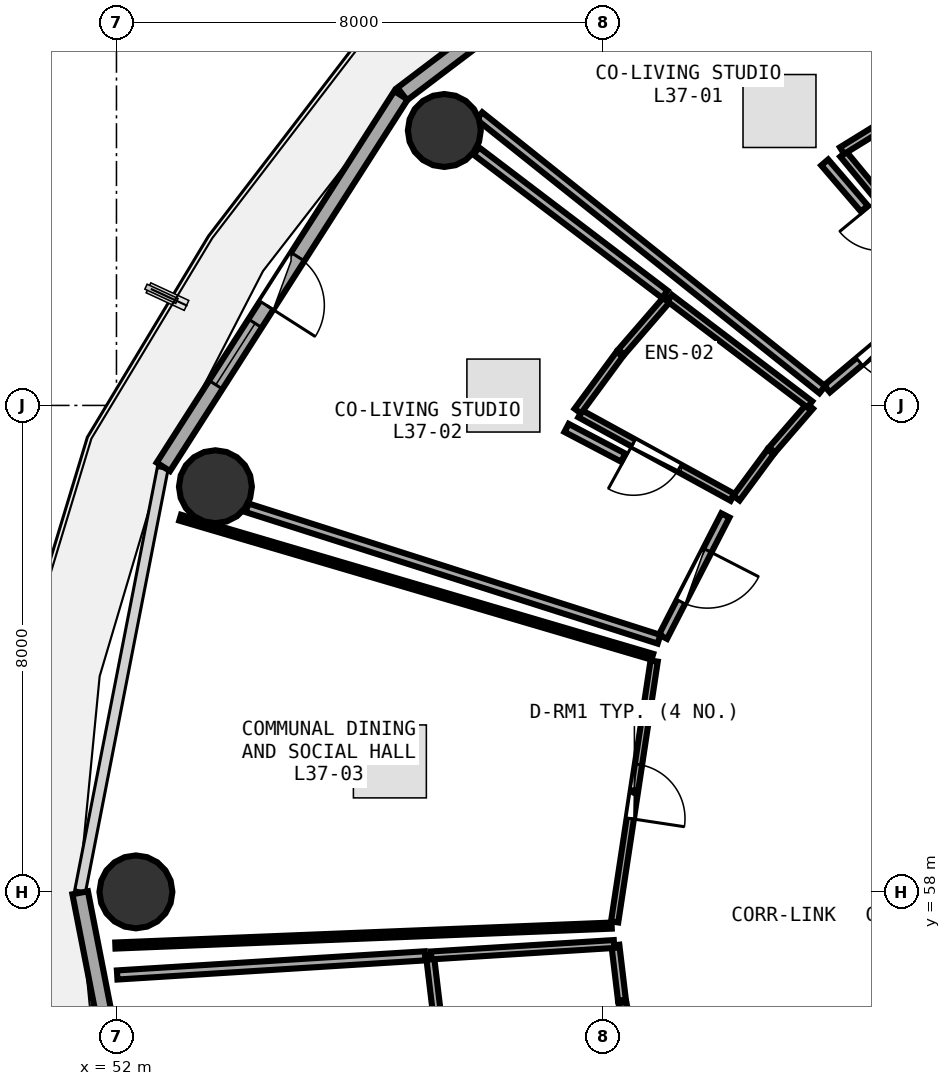
"""IFC4 building model, lengths in metres.
Left out: names, types, materials, properties, quantities, classifications, styles, units other than length and angle.
Written with IfcOpenShell. Run it as: python <this file> out.ifc"""

import sys

from ifc_helpers import new_model, si_unit, direction, frame, frame_2d, origin, origin_2d, place, context, subcontext, project, spatial, rectangle, circle, extrude, element, fill, save


model = new_model("IFC4")
c1 = context("Model", 3, precision=1e-05, world=origin(), true_north=direction((0.0, 1.0)))
c2 = subcontext(c1, "Body", "Model", "MODEL_VIEW")
j1 = project(units=[si_unit("LENGTHUNIT", "METRE"), si_unit("PLANEANGLEUNIT", "RADIAN")], contexts=[c1])
p1 = place(None, origin())
s1 = spatial("IfcSite", under=j1, at=p1, CompositionType="ELEMENT")
p2 = place(p1, origin())
s2 = spatial("IfcBuilding", under=s1, at=p2, CompositionType="ELEMENT")
p3 = place(p2, frame((0.0, 0.0, 146.85)))
s3 = spatial("IfcBuildingStorey", under=s2, at=p3, CompositionType="ELEMENT", Elevation=146.85)
for number, where, z_axis, x_axis in (
    (1, (57.392, 70.521, 0.0), (0.0, 0.0, 1.0), (1.0, 0.0, 0.0)),
    (2, (53.627, 64.663, 0.0), (0.0, 0.0, 1.0), (1.0, 0.0, 0.0)),
    (3, (52.32, 58.0, 0.0), (0.0, 0.0, 1.0), (1.0, 0.0, 0.0)),
):
    element("IfcColumn", number, at=place(p3, frame(where, z_axis=z_axis, x_axis=x_axis)), inside=s3, PredefinedType="COLUMN", context=c2, shape_type="SweptSolid", body=[
        extrude(circle(Radius=0.6, at=origin_2d()), origin(), (0.0, 0.0, 1.0), 3.75),
    ])
p4 = place(p3, frame((62.688, 75.658, 0.0), z_axis=(0.0, 0.0, 1.0), x_axis=(-0.797163719609, -0.603763202042, 0.0)))
e4 = element("IfcWall", 4, at=p4, inside=s3, PredefinedType="SOLIDWALL", context=c2, shape_type="SweptSolid", body=[
    extrude(rectangle(XDim=7.512, YDim=0.26, at=frame_2d((3.756, 0.0))), origin(), (0.0, 0.0, 1.0), 3.475),
])
p5 = place(p4, frame((2.956, 0.0, 0.85)))
e5 = element("IfcOpeningElement", 5, at=p5, cuts=e4, PredefinedType="OPENING", context=c2, shape_type="SweptSolid", body=[
    extrude(rectangle(XDim=1.6, YDim=1.45, at=frame_2d((0.8, 0.725))), frame((0.0, 0.14, 0.0), z_axis=(0.0, -1.0, 0.0), x_axis=(1.0, 0.0, 0.0)), (0.0, 0.0, 1.0), 0.28),
])
p6 = place(p3, frame((56.679, 71.1, 0.0), z_axis=(0.0, 0.0, 1.0), x_axis=(-0.538801521808, -0.842432739213, 0.0)))
e6 = element("IfcWall", 6, at=p6, inside=s3, PredefinedType="SOLIDWALL", context=c2, shape_type="SweptSolid", body=[
    extrude(rectangle(XDim=7.253, YDim=0.26, at=frame_2d((3.627, 0.0))), origin(), (0.0, 0.0, 1.0), 3.475),
])
p7 = place(p6, frame((3.152, 0.0, 0.0)))
e7 = element("IfcOpeningElement", 7, at=p7, cuts=e6, PredefinedType="OPENING", context=c2, shape_type="SweptSolid", body=[
    extrude(rectangle(XDim=0.95, YDim=2.1, at=frame_2d((0.475, 1.05))), frame((0.0, 0.14, 0.0), z_axis=(0.0, -1.0, 0.0), x_axis=(1.0, 0.0, 0.0)), (0.0, 0.0, 1.0), 0.28),
])
p8 = place(p6, frame((4.452, 0.0, 0.85)))
e8 = element("IfcOpeningElement", 8, at=p8, cuts=e6, PredefinedType="OPENING", context=c2, shape_type="SweptSolid", body=[
    extrude(rectangle(XDim=1.2, YDim=1.45, at=frame_2d((0.6, 0.725))), frame((0.0, 0.14, 0.0), z_axis=(0.0, -1.0, 0.0), x_axis=(1.0, 0.0, 0.0)), (0.0, 0.0, 1.0), 0.28),
])
p9 = place(p3, frame((51.403, 57.985, 0.0), z_axis=(0.0, 0.0, 1.0), x_axis=(0.191716984769, -0.981450252306, 0.0)))
e9 = element("IfcWall", 9, at=p9, inside=s3, PredefinedType="SOLIDWALL", context=c2, shape_type="SweptSolid", body=[
    extrude(rectangle(XDim=7.079, YDim=0.26, at=frame_2d((3.54, 0.0))), origin(), (0.0, 0.0, 1.0), 3.475),
])
p10 = place(p9, frame((2.74, 0.0, 0.85)))
e10 = element("IfcOpeningElement", 10, at=p10, cuts=e9, PredefinedType="OPENING", context=c2, shape_type="SweptSolid", body=[
    extrude(rectangle(XDim=1.6, YDim=1.45, at=frame_2d((0.8, 0.725))), frame((0.0, 0.14, 0.0), z_axis=(0.0, -1.0, 0.0), x_axis=(1.0, 0.0, 0.0)), (0.0, 0.0, 1.0), 0.28),
])
p11 = place(p3, frame((65.702, 68.016, 0.0), z_axis=(0.0, 0.0, 1.0), x_axis=(-0.636757315483, 0.771064278241, 0.0)))
e11 = element("IfcWall", 11, at=p11, inside=s3, PredefinedType="PLUMBINGWALL", context=c2, shape_type="SweptSolid", body=[
    extrude(rectangle(XDim=2.745, YDim=0.13, at=frame_2d((1.373, 0.0))), origin(), (0.0, 0.0, 1.0), 2.975),
])
p12 = place(p11, frame((0.942, 0.0, 0.0)))
e12 = element("IfcOpeningElement", 12, at=p12, cuts=e11, PredefinedType="OPENING", context=c2, shape_type="SweptSolid", body=[
    extrude(rectangle(XDim=0.86, YDim=2.05, at=frame_2d((0.43, 1.025))), frame((0.0, 0.075, 0.0), z_axis=(0.0, -1.0, 0.0), x_axis=(1.0, 0.0, 0.0)), (0.0, 0.0, 1.0), 0.15),
])
p13 = place(p3, frame((65.473, 67.78, 0.0), z_axis=(0.0, 0.0, 1.0), x_axis=(-0.764572750514, -0.644537438146, 0.0)))
e13 = element("IfcWall", 13, at=p13, inside=s3, PredefinedType="PARTITIONING", context=c2, shape_type="SweptSolid", body=[
    extrude(rectangle(XDim=2.339, YDim=0.15, at=frame_2d((1.169, 0.0))), origin(), (0.0, 0.0, 1.0), 2.975),
])
p14 = place(p13, frame((0.694, 0.0, 0.0)))
e14 = element("IfcOpeningElement", 14, at=p14, cuts=e13, PredefinedType="OPENING", context=c2, shape_type="SweptSolid", body=[
    extrude(rectangle(XDim=0.95, YDim=2.08, at=frame_2d((0.475, 1.04))), frame((0.0, 0.085, 0.0), z_axis=(0.0, -1.0, 0.0), x_axis=(1.0, 0.0, 0.0)), (0.0, 0.0, 1.0), 0.17),
])
p15 = place(p3, frame((62.131, 64.489, 0.0), z_axis=(0.0, 0.0, 1.0), x_axis=(-0.87680194327, 0.480851694681, 0.0)))
e15 = element("IfcWall", 15, at=p15, inside=s3, PredefinedType="PLUMBINGWALL", context=c2, shape_type="SweptSolid", body=[
    extrude(rectangle(XDim=2.855, YDim=0.13, at=frame_2d((1.428, 0.0))), origin(), (0.0, 0.0, 1.0), 2.975),
])
p16 = place(p15, frame((0.998, 0.0, 0.0)))
e16 = element("IfcOpeningElement", 16, at=p16, cuts=e15, PredefinedType="OPENING", context=c2, shape_type="SweptSolid", body=[
    extrude(rectangle(XDim=0.86, YDim=2.05, at=frame_2d((0.43, 1.025))), frame((0.0, 0.075, 0.0), z_axis=(0.0, -1.0, 0.0), x_axis=(1.0, 0.0, 0.0)), (0.0, 0.0, 1.0), 0.15),
])
p17 = place(p3, frame((62.015, 64.192, 0.0), z_axis=(0.0, 0.0, 1.0), x_axis=(-0.457234963971, -0.889345932538, 0.0)))
e17 = element("IfcWall", 17, at=p17, inside=s3, PredefinedType="PARTITIONING", context=c2, shape_type="SweptSolid", body=[
    extrude(rectangle(XDim=2.245, YDim=0.15, at=frame_2d((1.122, 0.0))), origin(), (0.0, 0.0, 1.0), 3.235),
])
p18 = place(p17, frame((0.647, 0.0, 0.0)))
e18 = element("IfcOpeningElement", 18, at=p18, cuts=e17, PredefinedType="OPENING", context=c2, shape_type="SweptSolid", body=[
    extrude(rectangle(XDim=0.95, YDim=2.08, at=frame_2d((0.475, 1.04))), frame((0.0, 0.085, 0.0), z_axis=(0.0, -1.0, 0.0), x_axis=(1.0, 0.0, 0.0)), (0.0, 0.0, 1.0), 0.17),
])
p19 = place(p3, frame((60.843, 61.796, 0.0), z_axis=(0.0, 0.0, 1.0), x_axis=(-0.149807046494, -0.988715251638, 0.0)))
e19 = element("IfcWall", 19, at=p19, inside=s3, PredefinedType="PARTITIONING", context=c2, shape_type="SweptSolid", body=[
    extrude(rectangle(XDim=4.338, YDim=0.12, at=frame_2d((2.169, 0.0))), origin(), (0.0, 0.0, 1.0), 2.975),
])
p20 = place(p19, frame((1.719, 0.0, 0.0)))
e20 = element("IfcOpeningElement", 20, at=p20, cuts=e19, PredefinedType="OPENING", context=c2, shape_type="SweptSolid", body=[
    extrude(rectangle(XDim=0.9, YDim=2.08, at=frame_2d((0.45, 1.04))), frame((0.0, 0.07, 0.0), z_axis=(0.0, -1.0, 0.0), x_axis=(1.0, 0.0, 0.0)), (0.0, 0.0, 1.0), 0.14),
])
p21 = place(p3, frame((67.918, 69.207, 0.0), z_axis=(0.0, 0.0, 1.0), x_axis=(-0.475160964166, 0.879898890858, 0.0)))
e21 = element("IfcWall", 21, at=p21, inside=s3, PredefinedType="PARTITIONING", context=c2, shape_type="SweptSolid", body=[
    extrude(rectangle(XDim=7.53, YDim=0.1, at=frame_2d((3.765, 0.0))), origin(), (0.0, 0.0, 1.0), 3.025),
])
p22 = place(p3, frame((63.933, 70.189, 0.0), z_axis=(0.0, 0.0, 1.0), x_axis=(0.851319302067, 0.524647925688, 0.0)))
e22 = element("IfcWall", 22, at=p22, inside=s3, PredefinedType="PLUMBINGWALL", context=c2, shape_type="SweptSolid", body=[
    extrude(rectangle(XDim=1.212, YDim=0.13, at=frame_2d((0.606, 0.0))), origin(), (0.0, 0.0, 1.0), 2.975),
])
p23 = place(p3, frame((63.608, 66.259, 0.0), z_axis=(0.0, 0.0, 1.0), x_axis=(-0.781429667655, 0.623993328898, 0.0)))
e23 = element("IfcWall", 23, at=p23, inside=s3, PredefinedType="PARTITIONING", context=c2, shape_type="SweptSolid", body=[
    extrude(rectangle(XDim=7.216, YDim=0.15, at=frame_2d((3.608, 0.0))), origin(), (0.0, 0.0, 1.0), 2.975),
])
p24 = place(p3, frame((63.688, 75.534, 0.0), z_axis=(0.0, 0.0, 1.0), x_axis=(0.505850409321, -0.862621216636, 0.0)))
e24 = element("IfcWall", 24, at=p24, inside=s3, PredefinedType="PARTITIONING", context=c2, shape_type="SweptSolid", body=[
    extrude(rectangle(XDim=4.69, YDim=0.15, at=frame_2d((2.345, 0.0))), origin(), (0.0, 0.0, 1.0), 3.025),
])
p25 = place(p3, frame((63.648, 69.996, 0.0), z_axis=(0.0, 0.0, 1.0), x_axis=(0.651733897109, -0.758447709047, 0.0)))
e25 = element("IfcWall", 25, at=p25, inside=s3, PredefinedType="PARTITIONING", context=c2, shape_type="SweptSolid", body=[
    extrude(rectangle(XDim=1.002, YDim=0.15, at=frame_2d((0.501, 0.0))), origin(), (0.0, 0.0, 1.0), 3.48),
])
p26 = place(p3, frame((63.406, 65.989, 0.0), z_axis=(0.0, 0.0, 1.0), x_axis=(-0.654452758924, -0.756102894015, 0.0)))
e26 = element("IfcWall", 26, at=p26, inside=s3, PredefinedType="PLUMBINGWALL", context=c2, shape_type="SweptSolid", body=[
    extrude(rectangle(XDim=0.954, YDim=0.13, at=frame_2d((0.477, 0.0))), origin(), (0.0, 0.0, 1.0), 3.48),
])
p27 = place(p3, frame((62.757, 65.237, 0.0), z_axis=(0.0, 0.0, 1.0), x_axis=(-0.593701036402, -0.804685702231, 0.0)))
e27 = element("IfcWall", 27, at=p27, inside=s3, PredefinedType="PLUMBINGWALL", context=c2, shape_type="SweptSolid", body=[
    extrude(rectangle(XDim=0.945, YDim=0.13, at=frame_2d((0.473, 0.0))), origin(), (0.0, 0.0, 1.0), 2.975),
])
p28 = place(p3, frame((59.587, 65.907, 0.0), z_axis=(0.0, 0.0, 1.0), x_axis=(0.592518663081, 0.805556722956, 0.0)))
e28 = element("IfcWall", 28, at=p28, inside=s3, PredefinedType="PLUMBINGWALL", context=c2, shape_type="SweptSolid", body=[
    extrude(rectangle(XDim=1.163, YDim=0.13, at=frame_2d((0.582, 0.0))), origin(), (0.0, 0.0, 1.0), 3.48),
])
p29 = place(p3, frame((60.301, 66.875, 0.0), z_axis=(0.0, 0.0, 1.0), x_axis=(0.654502595292, 0.756059754752, 0.0)))
e29 = element("IfcWall", 29, at=p29, inside=s3, PredefinedType="PLUMBINGWALL", context=c2, shape_type="SweptSolid", body=[
    extrude(rectangle(XDim=1.173, YDim=0.13, at=frame_2d((0.586, 0.0))), origin(), (0.0, 0.0, 1.0), 3.48),
])
p30 = place(p3, frame((61.098, 67.765, 0.0), z_axis=(0.0, 0.0, 1.0), x_axis=(0.796687067956, -0.604392021581, 0.0)))
e30 = element("IfcWall", 30, at=p30, inside=s3, PredefinedType="PLUMBINGWALL", context=c2, shape_type="SweptSolid", body=[
    extrude(rectangle(XDim=2.894, YDim=0.13, at=frame_2d((1.447, 0.0))), origin(), (0.0, 0.0, 1.0), 3.235),
])
p31 = place(p3, frame((60.923, 62.154, 0.0), z_axis=(0.0, 0.0, 1.0), x_axis=(-0.952653075659, 0.304059397878, 0.0)))
e31 = element("IfcWall", 31, at=p31, inside=s3, PredefinedType="PARTITIONING", context=c2, shape_type="SweptSolid", body=[
    extrude(rectangle(XDim=7.112, YDim=0.15, at=frame_2d((3.556, 0.0))), origin(), (0.0, 0.0, 1.0), 3.175),
])
p32 = place(p3, frame((57.918, 70.184, 0.0), z_axis=(0.0, 0.0, 1.0), x_axis=(0.796177895966, -0.605062606657, 0.0)))
e32 = element("IfcWall", 32, at=p32, inside=s3, PredefinedType="PARTITIONING", context=c2, shape_type="SweptSolid", body=[
    extrude(rectangle(XDim=3.895, YDim=0.15, at=frame_2d((1.948, 0.0))), origin(), (0.0, 0.0, 1.0), 2.975),
])
p33 = place(p3, frame((59.402, 65.63, 0.0), z_axis=(0.0, 0.0, 1.0), x_axis=(0.885450338388, -0.46473400806, 0.0)))
e33 = element("IfcWall", 33, at=p33, inside=s3, PredefinedType="PARTITIONING", context=c2, shape_type="SweptSolid", body=[
    extrude(rectangle(XDim=1.054, YDim=0.15, at=frame_2d((0.527, 0.0))), origin(), (0.0, 0.0, 1.0), 3.48),
])
p34 = place(p3, frame((60.144, 57.445, 0.0), z_axis=(0.0, 0.0, 1.0), x_axis=(-0.99919531507, -0.040108881097, 0.0)))
e34 = element("IfcWall", 34, at=p34, inside=s3, PredefinedType="PARTITIONING", context=c2, shape_type="SweptSolid", body=[
    extrude(rectangle(XDim=8.169, YDim=0.1, at=frame_2d((4.084, 0.0))), origin(), (0.0, 0.0, 1.0), 3.025),
])
p35 = place(p3, frame((53.047, 64.154, 0.0), z_axis=(0.0, 0.0, 1.0), x_axis=(0.959252584651, -0.282549958133, 0.0)))
e35 = element("IfcWall", 35, at=p35, inside=s3, PredefinedType="PARTITIONING", context=c2, shape_type="SweptSolid", body=[
    extrude(rectangle(XDim=8.096, YDim=0.1, at=frame_2d((4.048, 0.0))), origin(), (0.0, 0.0, 1.0), 3.025),
])
p36 = place(p3, frame((60.205, 57.124, 0.0), z_axis=(0.0, 0.0, 1.0), x_axis=(0.118797046487, -0.992918557459, 0.0)))
e36 = element("IfcWall", 36, at=p36, inside=s3, PredefinedType="PLUMBINGWALL", context=c2, shape_type="SweptSolid", body=[
    extrude(rectangle(XDim=0.912, YDim=0.13, at=frame_2d((0.456, 0.0))), origin(), (0.0, 0.0, 1.0), 3.48),
])
p37 = place(p3, frame((60.32, 56.178, 0.0), z_axis=(0.0, 0.0, 1.0), x_axis=(0.202067144879, -0.979371670491, 0.0)))
e37 = element("IfcWall", 37, at=p37, inside=s3, PredefinedType="PLUMBINGWALL", context=c2, shape_type="SweptSolid", body=[
    extrude(rectangle(XDim=0.915, YDim=0.13, at=frame_2d((0.457, 0.0))), origin(), (0.0, 0.0, 1.0), 3.48),
])
p38 = place(p3, frame((57.292, 55.819, 0.0), z_axis=(0.0, 0.0, 1.0), x_axis=(-0.11846804652, 0.992957865145, 0.0)))
e38 = element("IfcWall", 38, at=p38, inside=s3, PredefinedType="PLUMBINGWALL", context=c2, shape_type="SweptSolid", body=[
    extrude(rectangle(XDim=1.123, YDim=0.13, at=frame_2d((0.562, 0.0))), origin(), (0.0, 0.0, 1.0), 3.48),
])
p39 = place(p3, frame((57.176, 56.955, 0.0), z_axis=(0.0, 0.0, 1.0), x_axis=(0.998056675164, 0.062312704652, 0.0)))
e39 = element("IfcWall", 39, at=p39, inside=s3, PredefinedType="PLUMBINGWALL", context=c2, shape_type="SweptSolid", body=[
    extrude(rectangle(XDim=3.013, YDim=0.13, at=frame_2d((1.506, 0.0))), origin(), (0.0, 0.0, 1.0), 3.175),
])
p40 = place(p3, frame((52.012, 56.634, 0.0), z_axis=(0.0, 0.0, 1.0), x_axis=(0.998071814667, 0.062069741162, 0.0)))
e40 = element("IfcWall", 40, at=p40, inside=s3, PredefinedType="PARTITIONING", context=c2, shape_type="SweptSolid", body=[
    extrude(rectangle(XDim=5.074, YDim=0.15, at=frame_2d((2.537, 0.0))), origin(), (0.0, 0.0, 1.0), 3.025),
])
p41 = place(p7, frame((0.95, 0.0, 0.0), z_axis=(0.0, 0.0, 1.0), x_axis=(-1.0, 0.0, 0.0)))
e41 = element("IfcDoor", 41, at=p41, inside=s3, OperationType="SINGLE_SWING_LEFT", PredefinedType="DOOR", context=c2, shape_type="SweptSolid", body=[
    extrude(rectangle(XDim=0.95, YDim=2.1, at=frame_2d((0.475, 1.05))), frame((0.0, 0.025, 0.0), z_axis=(0.0, -1.0, 0.0), x_axis=(1.0, 0.0, 0.0)), (0.0, 0.0, 1.0), 0.05),
])
fill(e7, e41)
p42 = place(p8, origin())
e42 = element("IfcWindow", 42, at=p42, inside=s3, PartitioningType="SINGLE_PANEL", PredefinedType="WINDOW", context=c2, shape_type="SweptSolid", body=[
    extrude(rectangle(XDim=1.2, YDim=1.45, at=frame_2d((0.6, 0.725))), frame((0.0, 0.03, 0.0), z_axis=(0.0, -1.0, 0.0), x_axis=(1.0, 0.0, 0.0)), (0.0, 0.0, 1.0), 0.06),
])
fill(e8, e42)
p43 = place(p14, origin())
e43 = element("IfcDoor", 43, at=p43, inside=s3, OperationType="SINGLE_SWING_LEFT", PredefinedType="DOOR", context=c2, shape_type="SweptSolid", body=[
    extrude(rectangle(XDim=0.95, YDim=2.08, at=frame_2d((0.475, 1.04))), frame((0.0, 0.025, 0.0), z_axis=(0.0, -1.0, 0.0), x_axis=(1.0, 0.0, 0.0)), (0.0, 0.0, 1.0), 0.05),
])
fill(e14, e43)
p44 = place(p16, origin())
e44 = element("IfcDoor", 44, at=p44, inside=s3, OperationType="SINGLE_SWING_RIGHT", PredefinedType="DOOR", context=c2, shape_type="SweptSolid", body=[
    extrude(rectangle(XDim=0.86, YDim=2.05, at=frame_2d((0.43, 1.025))), frame((0.0, 0.025, 0.0), z_axis=(0.0, -1.0, 0.0), x_axis=(1.0, 0.0, 0.0)), (0.0, 0.0, 1.0), 0.05),
])
fill(e16, e44)
p45 = place(p18, origin())
e45 = element("IfcDoor", 45, at=p45, inside=s3, OperationType="SINGLE_SWING_LEFT", PredefinedType="DOOR", context=c2, shape_type="SweptSolid", body=[
    extrude(rectangle(XDim=0.95, YDim=2.08, at=frame_2d((0.475, 1.04))), frame((0.0, 0.025, 0.0), z_axis=(0.0, -1.0, 0.0), x_axis=(1.0, 0.0, 0.0)), (0.0, 0.0, 1.0), 0.05),
])
fill(e18, e45)
p46 = place(p20, origin())
e46 = element("IfcDoor", 46, at=p46, inside=s3, OperationType="SINGLE_SWING_RIGHT", PredefinedType="DOOR", context=c2, shape_type="SweptSolid", body=[
    extrude(rectangle(XDim=0.9, YDim=2.08, at=frame_2d((0.45, 1.04))), frame((0.0, 0.025, 0.0), z_axis=(0.0, -1.0, 0.0), x_axis=(1.0, 0.0, 0.0)), (0.0, 0.0, 1.0), 0.05),
])
fill(e20, e46)
save(model, sys.argv[1])
